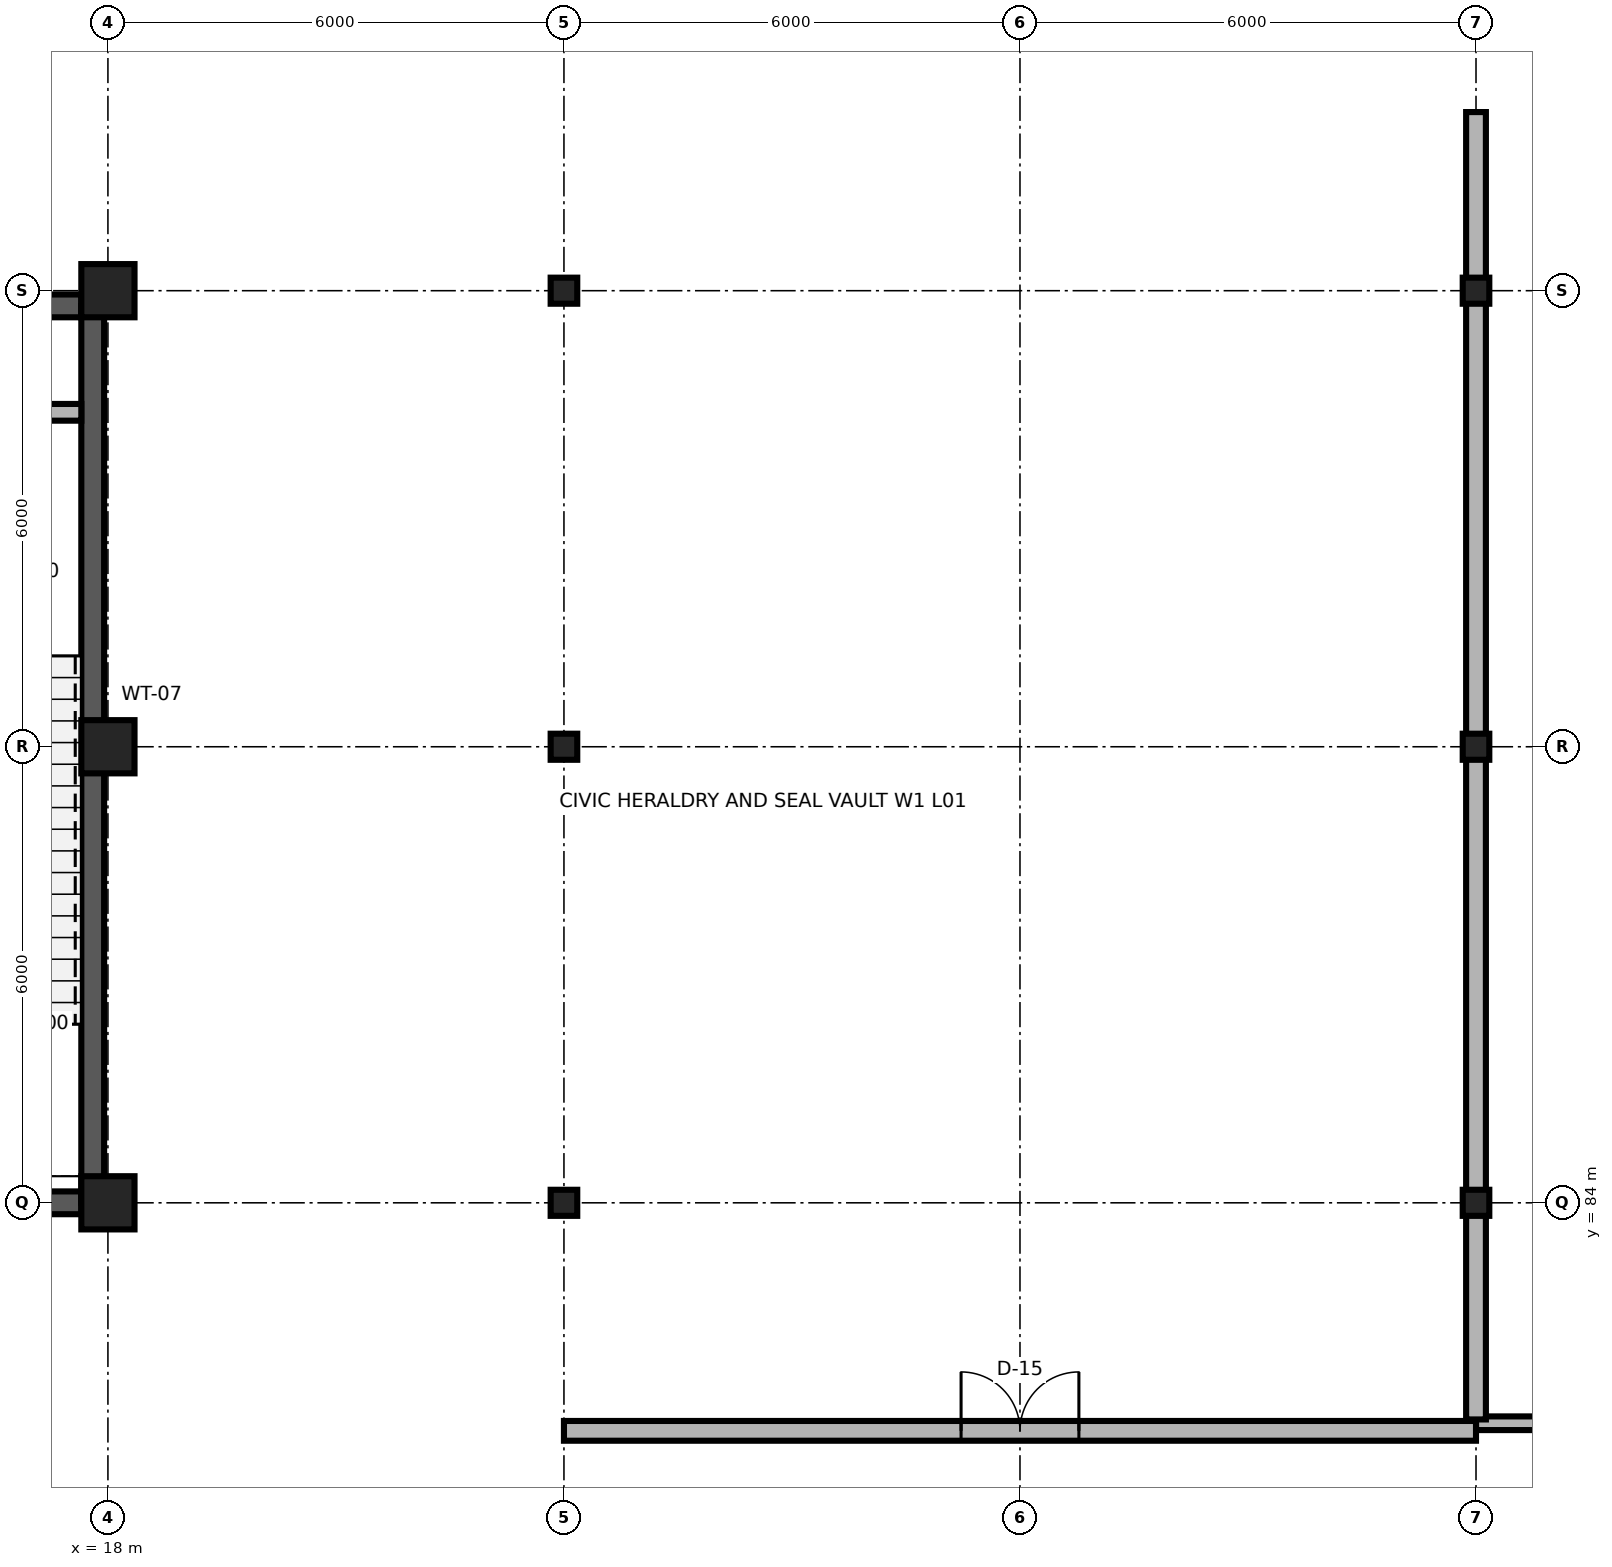
"""IFC4 building model, lengths in metres.
Left out: names, types, materials, properties, quantities, classifications, styles, units other than length and angle.
Written with IfcOpenShell. Run it as: python <this file> out.ifc"""

import sys

from ifc_helpers import new_model, si_unit, direction, frame, frame_2d, origin, origin_2d, place, context, subcontext, project, spatial, rectangle, i_section, extrude, element, fill, save


model = new_model("IFC4")
c1 = context("Model", 3, precision=1e-05, world=origin(), true_north=direction((0.0, 1.0)))
c2 = subcontext(c1, "Body", "Model", "MODEL_VIEW")
j1 = project(units=[si_unit("LENGTHUNIT", "METRE"), si_unit("PLANEANGLEUNIT", "RADIAN")], contexts=[c1])
p1 = place(None, origin())
s1 = spatial("IfcSite", under=j1, at=p1, CompositionType="ELEMENT")
p2 = place(p1, origin())
s2 = spatial("IfcBuilding", under=s1, at=p2, CompositionType="ELEMENT")
p3 = place(p2, origin())
s3 = spatial("IfcBuildingStorey", under=s2, at=p3, CompositionType="ELEMENT", Elevation=0.0)
p4 = place(p3, frame((18.0, 84.0, 0.0), z_axis=(0.0, 0.0, 1.0), x_axis=(1.0, 0.0, 0.0)))
e1 = element("IfcColumn", 1, at=p4, inside=s3, PredefinedType="COLUMN", context=c2, shape_type="SweptSolid", body=[
    extrude(rectangle(XDim=0.7, YDim=0.7, at=origin_2d()), origin(), (0.0, 0.0, 1.0), 6.0),
])
for number, where, z_axis, x_axis in (
    (2, (24.0, 84.0, 0.0), (0.0, 0.0, 1.0), (1.0, 0.0, 0.0)),
    (3, (36.0, 84.0, 0.0), (0.0, 0.0, 1.0), (1.0, 0.0, 0.0)),
):
    element("IfcColumn", number, at=place(p3, frame(where, z_axis=z_axis, x_axis=x_axis)), inside=s3, PredefinedType="COLUMN", context=c2, shape_type="SweptSolid", body=[
        extrude(i_section(OverallWidth=0.35, OverallDepth=0.343, WebThickness=0.01, FlangeThickness=0.015, FilletRadius=0.02, at=origin_2d()), origin(), (0.0, 0.0, 1.0), 6.0),
    ])
p5 = place(p3, frame((18.0, 90.0, 0.0), z_axis=(0.0, 0.0, 1.0), x_axis=(1.0, 0.0, 0.0)))
e4 = element("IfcColumn", 4, at=p5, inside=s3, PredefinedType="COLUMN", context=c2, shape_type="SweptSolid", body=[
    extrude(rectangle(XDim=0.7, YDim=0.7, at=origin_2d()), origin(), (0.0, 0.0, 1.0), 6.0),
])
for number, where, z_axis, x_axis in (
    (5, (24.0, 90.0, 0.0), (0.0, 0.0, 1.0), (1.0, 0.0, 0.0)),
    (6, (36.0, 90.0, 0.0), (0.0, 0.0, 1.0), (1.0, 0.0, 0.0)),
):
    element("IfcColumn", number, at=place(p3, frame(where, z_axis=z_axis, x_axis=x_axis)), inside=s3, PredefinedType="COLUMN", context=c2, shape_type="SweptSolid", body=[
        extrude(i_section(OverallWidth=0.35, OverallDepth=0.343, WebThickness=0.01, FlangeThickness=0.015, FilletRadius=0.02, at=origin_2d()), origin(), (0.0, 0.0, 1.0), 6.0),
    ])
p6 = place(p3, frame((18.0, 96.0, 0.0), z_axis=(0.0, 0.0, 1.0), x_axis=(1.0, 0.0, 0.0)))
e7 = element("IfcColumn", 7, at=p6, inside=s3, PredefinedType="COLUMN", context=c2, shape_type="SweptSolid", body=[
    extrude(rectangle(XDim=0.7, YDim=0.7, at=origin_2d()), origin(), (0.0, 0.0, 1.0), 6.0),
])
for number, where, z_axis, x_axis in (
    (8, (24.0, 96.0, 0.0), (0.0, 0.0, 1.0), (1.0, 0.0, 0.0)),
    (9, (36.0, 96.0, 0.0), (0.0, 0.0, 1.0), (1.0, 0.0, 0.0)),
):
    element("IfcColumn", number, at=place(p3, frame(where, z_axis=z_axis, x_axis=x_axis)), inside=s3, PredefinedType="COLUMN", context=c2, shape_type="SweptSolid", body=[
        extrude(i_section(OverallWidth=0.35, OverallDepth=0.343, WebThickness=0.01, FlangeThickness=0.015, FilletRadius=0.02, at=origin_2d()), origin(), (0.0, 0.0, 1.0), 6.0),
    ])
p7 = place(p3, frame((12.35, 84.0, 0.0), z_axis=(0.0, 0.0, 1.0), x_axis=(1.0, 0.0, 0.0)))
e10 = element("IfcWall", 10, at=p7, inside=s3, PredefinedType="SHEAR", context=c2, shape_type="SweptSolid", body=[
    extrude(rectangle(XDim=5.3, YDim=0.3, at=frame_2d((2.65, 0.0))), origin(), (0.0, 0.0, 1.0), 5.76),
])
p8 = place(p7, frame((1.925, 0.0, 0.0)))
e11 = element("IfcOpeningElement", 11, at=p8, cuts=e10, PredefinedType="OPENING", context=c2, shape_type="SweptSolid", body=[
    extrude(rectangle(XDim=1.45, YDim=2.25, at=frame_2d((0.725, 1.125))), frame((0.0, 0.165, 0.0), z_axis=(0.0, -1.0, 0.0), x_axis=(1.0, 0.0, 0.0)), (0.0, 0.0, 1.0), 0.33),
])
p9 = place(p3, frame((12.35, 95.8, 0.0), z_axis=(0.0, 0.0, 1.0), x_axis=(1.0, 0.0, 0.0)))
e12 = element("IfcWall", 12, at=p9, inside=s3, PredefinedType="SHEAR", context=c2, shape_type="SweptSolid", body=[
    extrude(rectangle(XDim=5.3, YDim=0.3, at=frame_2d((2.65, 0.0))), origin(), (0.0, 0.0, 1.0), 5.76),
])
p10 = place(p3, frame((17.8, 84.0, 0.0), z_axis=(0.0, 0.0, 1.0), x_axis=(0.0, 1.0, 0.0)))
e13 = element("IfcWall", 13, at=p10, inside=s3, PredefinedType="SHEAR", context=c2, shape_type="SweptSolid", body=[
    extrude(rectangle(XDim=11.8, YDim=0.3, at=frame_2d((5.9, 0.0))), origin(), (0.0, 0.0, 1.0), 5.76),
])
p11 = place(p3, frame((16.55, 94.4, 0.0), z_axis=(0.0, 0.0, 1.0), x_axis=(1.0, 0.0, 0.0)))
e14 = element("IfcWall", 14, at=p11, inside=s3, PredefinedType="PARTITIONING", context=c2, shape_type="SweptSolid", body=[
    extrude(rectangle(XDim=1.1, YDim=0.22, at=frame_2d((0.55, 0.0))), origin(), (0.0, 0.0, 1.0), 5.76),
])
p12 = place(p3, frame((36.0, 81.1, 0.0), z_axis=(0.0, 0.0, 1.0), x_axis=(1.0, 0.0, 0.0)))
e15 = element("IfcWall", 15, at=p12, inside=s3, PredefinedType="PARTITIONING", context=c2, shape_type="SweptSolid", body=[
    extrude(rectangle(XDim=12.0, YDim=0.18, at=frame_2d((6.0, 0.0))), origin(), (0.0, 0.0, 1.0), 5.76),
])
p13 = place(p12, frame((5.125, 0.0, 0.0)))
e16 = element("IfcOpeningElement", 16, at=p13, cuts=e15, PredefinedType="OPENING", context=c2, shape_type="SweptSolid", body=[
    extrude(rectangle(XDim=1.75, YDim=2.55, at=frame_2d((0.875, 1.275))), frame((0.0, 0.105, 0.0), z_axis=(0.0, -1.0, 0.0), x_axis=(1.0, 0.0, 0.0)), (0.0, 0.0, 1.0), 0.21),
])
p14 = place(p3, frame((24.0, 81.0, 0.0), z_axis=(0.0, 0.0, 1.0), x_axis=(1.0, 0.0, 0.0)))
e17 = element("IfcWall", 17, at=p14, inside=s3, PredefinedType="PARTITIONING", context=c2, shape_type="SweptSolid", body=[
    extrude(rectangle(XDim=12.0, YDim=0.26, at=frame_2d((6.0, 0.0))), origin(), (0.0, 0.0, 1.0), 5.76),
])
p15 = place(p14, frame((5.225, 0.0, 0.0)))
e18 = element("IfcOpeningElement", 18, at=p15, cuts=e17, PredefinedType="OPENING", context=c2, shape_type="SweptSolid", body=[
    extrude(rectangle(XDim=1.55, YDim=2.3, at=frame_2d((0.775, 1.15))), frame((0.0, 0.145, 0.0), z_axis=(0.0, -1.0, 0.0), x_axis=(1.0, 0.0, 0.0)), (0.0, 0.0, 1.0), 0.29),
])
p16 = place(p3, frame((36.0, 81.15, 0.0), z_axis=(0.0, 0.0, 1.0), x_axis=(0.0, 1.0, 0.0)))
e19 = element("IfcWall", 19, at=p16, inside=s3, PredefinedType="PARTITIONING", context=c2, shape_type="SweptSolid", body=[
    extrude(rectangle(XDim=17.2, YDim=0.26, at=frame_2d((8.6, 0.0))), origin(), (0.0, 0.0, 1.0), 5.32),
])
p17 = place(p15, origin())
e20 = element("IfcDoor", 20, at=p17, inside=s3, OperationType="DOUBLE_DOOR_SINGLE_SWING", PredefinedType="DOOR", context=c2, shape_type="SweptSolid", body=[
    extrude(rectangle(XDim=1.55, YDim=2.3, at=frame_2d((0.775, 1.15))), frame((0.0, 0.025, 0.0), z_axis=(0.0, -1.0, 0.0), x_axis=(1.0, 0.0, 0.0)), (0.0, 0.0, 1.0), 0.05),
])
fill(e18, e20)
save(model, sys.argv[1])
